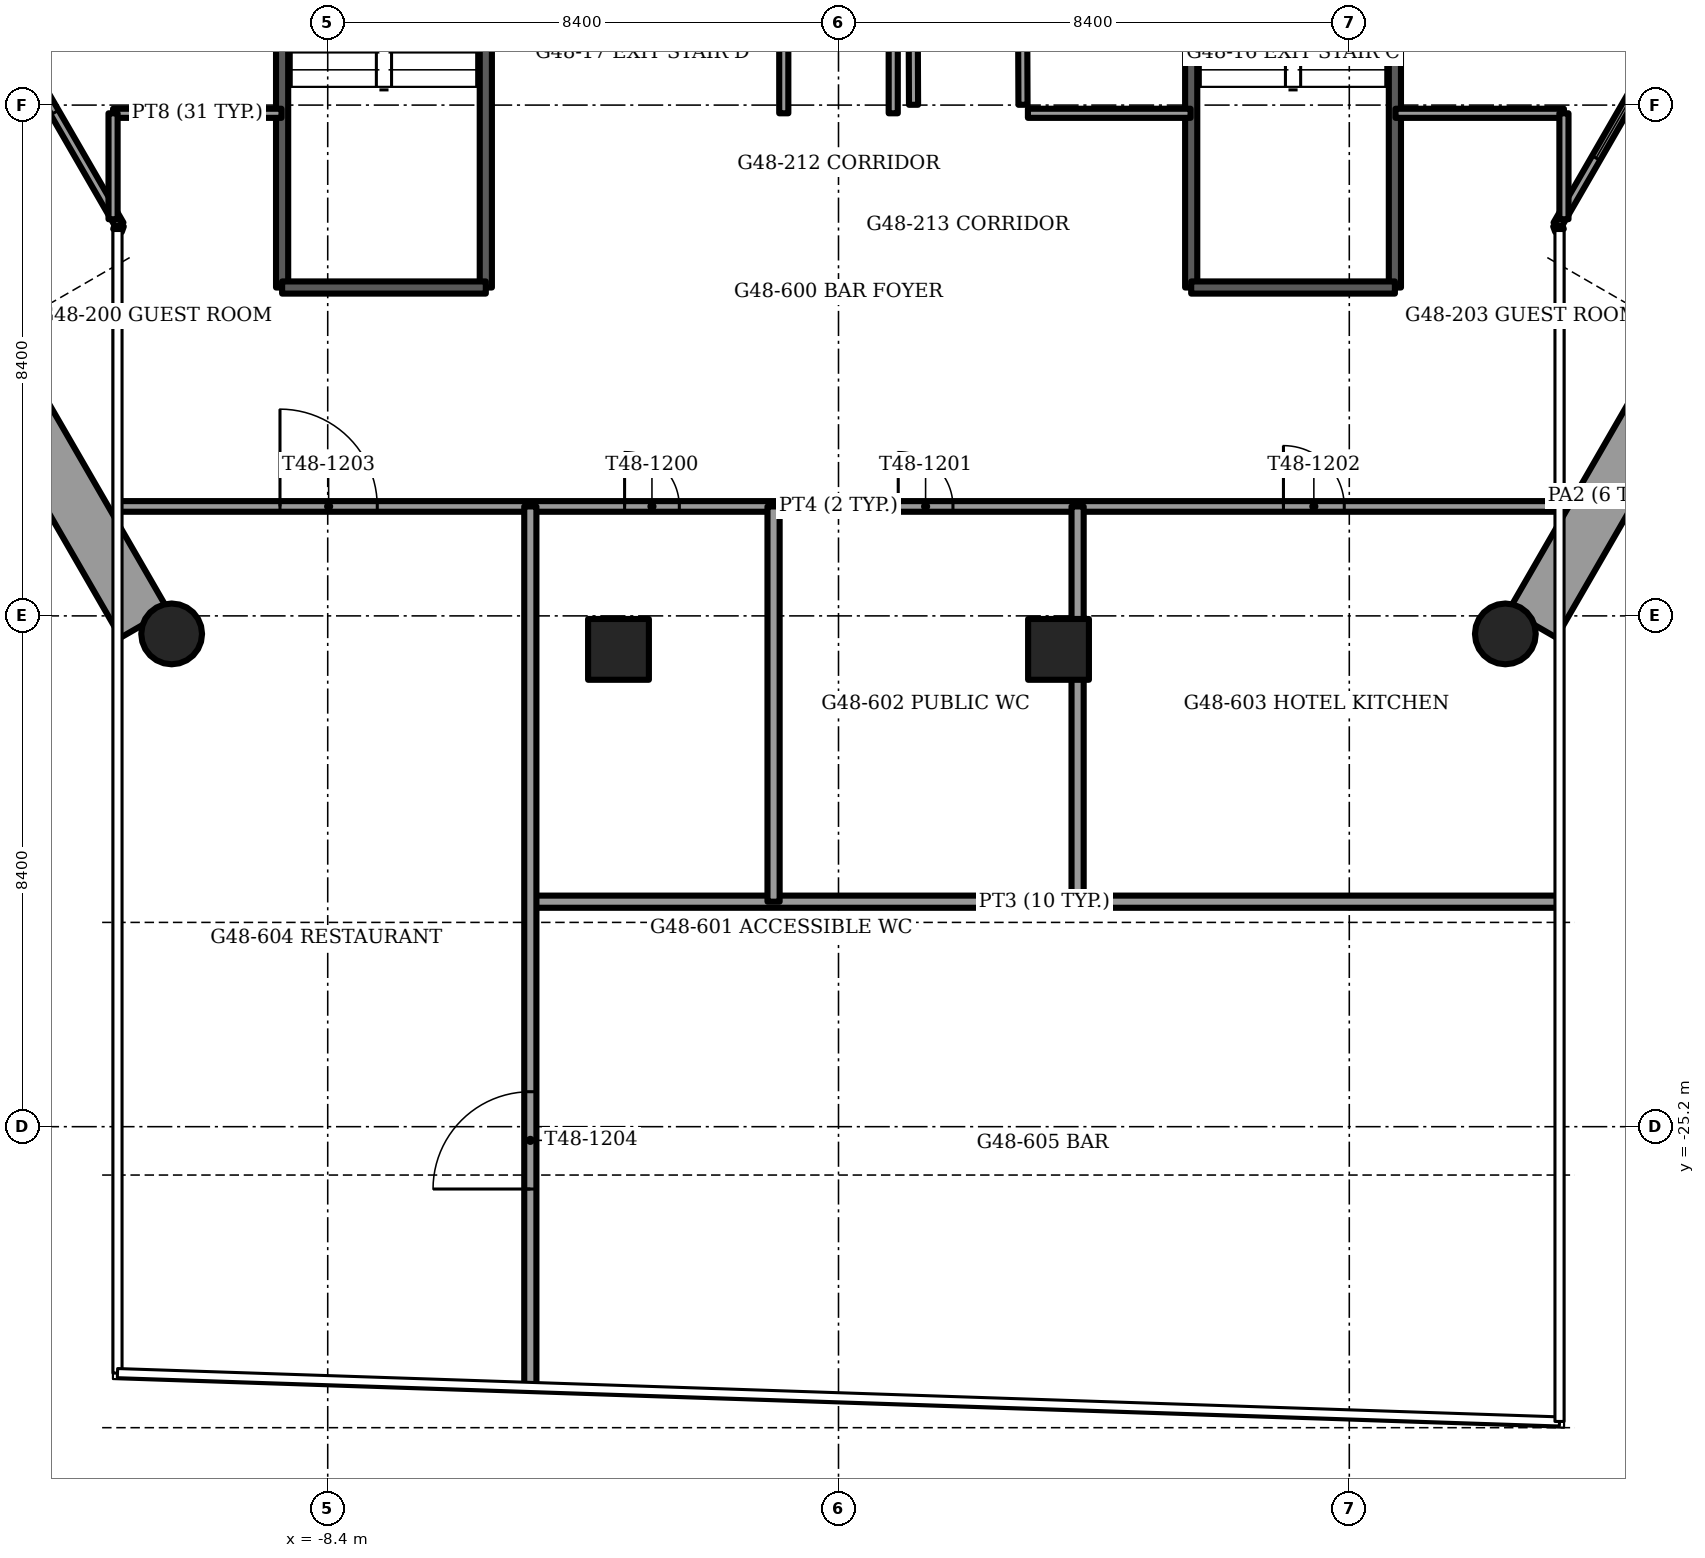
"""IFC4 building model, lengths in metres.
Left out: names, types, materials, properties, quantities, classifications, styles, units other than length and angle.
Written with IfcOpenShell. Run it as: python <this file> out.ifc"""

import sys

from ifc_helpers import new_model, si_unit, direction, frame, frame_2d, origin, origin_2d, place, context, subcontext, project, spatial, rectangle, circle, extrude, element, fill, save


model = new_model("IFC4")
c1 = context("Model", 3, precision=1e-05, world=origin(), true_north=direction((0.0, 1.0)))
c2 = subcontext(c1, "Body", "Model", "MODEL_VIEW")
j1 = project(units=[si_unit("LENGTHUNIT", "METRE"), si_unit("PLANEANGLEUNIT", "RADIAN")], contexts=[c1])
p1 = place(None, origin())
s1 = spatial("IfcSite", under=j1, at=p1, CompositionType="ELEMENT")
p2 = place(p1, origin())
s2 = spatial("IfcBuilding", under=s1, at=p2, CompositionType="ELEMENT")
p3 = place(p2, frame((0.0, 0.0, 194.5)))
s3 = spatial("IfcBuildingStorey", under=s2, at=p3, CompositionType="ELEMENT", Elevation=194.5)
for number, where, z_axis, x_axis in (
    (1, (-10.967, -17.096, -1.2), (0.0, 0.0, 1.0), (1.0, 0.0, 0.0)),
    (2, (10.967, -17.096, -1.2), (0.0, 0.0, 1.0), (1.0, 0.0, 0.0)),
):
    element("IfcColumn", number, at=place(p3, frame(where, z_axis=z_axis, x_axis=x_axis)), inside=s3, PredefinedType="COLUMN", context=c2, shape_type="SweptSolid", body=[
        extrude(circle(Radius=0.5, at=origin_2d()), origin(), (0.0, 0.0, 1.0), 3.75),
    ])
for number, where, z_axis, x_axis in (
    (3, (-3.618, -17.351, -1.2), (0.0, 0.0, 1.0), (-1.0, 0.0, 0.0)),
    (4, (3.618, -17.351, -1.2), (0.0, 0.0, 1.0), (-1.0, 0.0, 0.0)),
):
    element("IfcColumn", number, at=place(p3, frame(where, z_axis=z_axis, x_axis=x_axis)), inside=s3, PredefinedType="COLUMN", context=c2, shape_type="SweptSolid", body=[
        extrude(rectangle(XDim=1.0, YDim=1.0, at=origin_2d()), origin(), (0.0, 0.0, 1.0), 3.75),
    ])
for number, where, z_axis, x_axis in (
    (5, (-13.847, -12.715, 0.0), (0.0, 0.0, 1.0), (0.5, -0.866, 0.0)),
    (6, (11.414, -16.931, 0.0), (0.0, 0.0, 1.0), (0.5, 0.866, 0.0)),
):
    element("IfcWall", number, at=place(p3, frame(where, z_axis=z_axis, x_axis=x_axis)), inside=s3, PredefinedType="PARAPET", context=c2, shape_type="SweptSolid", body=[
        extrude(rectangle(XDim=4.868, YDim=0.9, at=frame_2d((2.434, 0.0))), origin(), (0.0, 0.0, 1.0), 1.1),
    ])
p4 = place(p3, frame((-16.956, -1.482, 0.0), z_axis=(0.0, 0.0, 1.0), x_axis=(0.499996992154, -0.866027140358, 0.0)))
e7 = element("IfcWall", 7, at=p4, inside=s3, PredefinedType="SOLIDWALL", context=c2, shape_type="SweptSolid", body=[
    extrude(rectangle(XDim=10.264, YDim=0.15, at=frame_2d((5.132, 0.0))), origin(), (0.0, 0.0, 1.0), 3.45),
])
p5 = place(p4, frame((2.885, 0.0, 0.15)))
e8 = element("IfcOpeningElement", 8, at=p5, cuts=e7, PredefinedType="OPENING", context=c2, shape_type="SweptSolid", body=[
    extrude(rectangle(XDim=1.6, YDim=2.2, at=frame_2d((0.8, 1.1))), frame((0.0, 0.075, 0.0), z_axis=(0.0, -1.0, 0.0), x_axis=(1.0, 0.0, 0.0)), (0.0, 0.0, 1.0), 0.15),
])
p6 = place(p4, frame((5.395, 0.0, 0.15)))
e9 = element("IfcOpeningElement", 9, at=p6, cuts=e7, PredefinedType="OPENING", context=c2, shape_type="SweptSolid", body=[
    extrude(rectangle(XDim=0.9, YDim=2.2, at=frame_2d((0.45, 1.1))), frame((0.0, 0.075, 0.0), z_axis=(0.0, -1.0, 0.0), x_axis=(1.0, 0.0, 0.0)), (0.0, 0.0, 1.0), 0.15),
])
p7 = place(p4, frame((6.73, 0.0, 0.0)))
e10 = element("IfcOpeningElement", 10, at=p7, cuts=e7, PredefinedType="OPENING", context=c2, shape_type="SweptSolid", body=[
    extrude(rectangle(XDim=1.4, YDim=2.4, at=frame_2d((0.7, 1.2))), frame((0.0, 0.075, 0.0), z_axis=(0.0, -1.0, 0.0), x_axis=(1.0, 0.0, 0.0)), (0.0, 0.0, 1.0), 0.15),
])
p8 = place(p3, frame((11.824, -10.37, 0.0), z_axis=(0.0, 0.0, 1.0), x_axis=(0.499996992154, 0.866027140358, 0.0)))
e11 = element("IfcWall", 11, at=p8, inside=s3, PredefinedType="SOLIDWALL", context=c2, shape_type="SweptSolid", body=[
    extrude(rectangle(XDim=10.264, YDim=0.15, at=frame_2d((5.132, 0.0))), origin(), (0.0, 0.0, 1.0), 3.45),
])
p9 = place(p8, frame((1.269, 0.0, 0.15)))
e12 = element("IfcOpeningElement", 12, at=p9, cuts=e11, PredefinedType="OPENING", context=c2, shape_type="SweptSolid", body=[
    extrude(rectangle(XDim=1.6, YDim=2.2, at=frame_2d((0.8, 1.1))), frame((0.0, 0.075, 0.0), z_axis=(0.0, -1.0, 0.0), x_axis=(1.0, 0.0, 0.0)), (0.0, 0.0, 1.0), 0.15),
])
p10 = place(p8, frame((3.469, 0.0, 0.0)))
e13 = element("IfcOpeningElement", 13, at=p10, cuts=e11, PredefinedType="OPENING", context=c2, shape_type="SweptSolid", body=[
    extrude(rectangle(XDim=1.4, YDim=2.4, at=frame_2d((0.7, 1.2))), frame((0.0, 0.075, 0.0), z_axis=(0.0, -1.0, 0.0), x_axis=(1.0, 0.0, 0.0)), (0.0, 0.0, 1.0), 0.15),
])
p11 = place(p8, frame((5.469, 0.0, 0.15)))
e14 = element("IfcOpeningElement", 14, at=p11, cuts=e11, PredefinedType="OPENING", context=c2, shape_type="SweptSolid", body=[
    extrude(rectangle(XDim=1.6, YDim=2.2, at=frame_2d((0.8, 1.1))), frame((0.0, 0.075, 0.0), z_axis=(0.0, -1.0, 0.0), x_axis=(1.0, 0.0, 0.0)), (0.0, 0.0, 1.0), 0.15),
])
for number, where, z_axis, x_axis in (
    (15, (-11.824, -10.37, 0.0), (0.0, 0.0, 1.0), (-0.339, -0.941, 0.0)),
    (16, (11.824, -10.37, 0.0), (0.0, 0.0, 1.0), (0.339, -0.941, 0.0)),
):
    element("IfcWall", number, at=place(p3, frame(where, z_axis=z_axis, x_axis=x_axis)), inside=s3, PredefinedType="SOLIDWALL", context=c2, shape_type="SweptSolid", body=[
        extrude(rectangle(XDim=0.098, YDim=0.15, at=frame_2d((0.049, 0.0))), origin(), (0.0, 0.0, 1.0), 3.45),
    ])
for number, where, z_axis, x_axis in (
    (17, (5.8, -3.7, -0.3), (0.0, 0.0, 1.0), (0.0, -1.0, 0.0)),
    (18, (9.15, -3.7, -0.3), (0.0, 0.0, 1.0), (0.0, -1.0, 0.0)),
):
    element("IfcWall", number, at=place(p3, frame(where, z_axis=z_axis, x_axis=x_axis)), inside=s3, PredefinedType="SOLIDWALL", context=c2, shape_type="SweptSolid", body=[
        extrude(rectangle(XDim=7.7, YDim=0.2, at=frame_2d((3.85, 0.0))), origin(), (0.0, 0.0, 1.0), 3.75),
    ])
p12 = place(p3, frame((5.8, -11.4, -0.3), z_axis=(0.0, 0.0, 1.0), x_axis=(1.0, 0.0, 0.0)))
e19 = element("IfcWall", 19, at=p12, inside=s3, PredefinedType="SOLIDWALL", context=c2, shape_type="SweptSolid", body=[
    extrude(rectangle(XDim=3.35, YDim=0.2, at=frame_2d((1.675, 0.0))), origin(), (0.0, 0.0, 1.0), 3.75),
])
for number, where, z_axis, x_axis in (
    (20, (-9.15, -3.7, -0.3), (0.0, 0.0, 1.0), (0.0, -1.0, 0.0)),
    (21, (-5.8, -3.7, -0.3), (0.0, 0.0, 1.0), (0.0, -1.0, 0.0)),
):
    element("IfcWall", number, at=place(p3, frame(where, z_axis=z_axis, x_axis=x_axis)), inside=s3, PredefinedType="SOLIDWALL", context=c2, shape_type="SweptSolid", body=[
        extrude(rectangle(XDim=7.7, YDim=0.2, at=frame_2d((3.85, 0.0))), origin(), (0.0, 0.0, 1.0), 3.75),
    ])
p13 = place(p3, frame((-9.15, -11.4, -0.3), z_axis=(0.0, 0.0, 1.0), x_axis=(1.0, 0.0, 0.0)))
e22 = element("IfcWall", 22, at=p13, inside=s3, PredefinedType="SOLIDWALL", context=c2, shape_type="SweptSolid", body=[
    extrude(rectangle(XDim=3.35, YDim=0.2, at=frame_2d((1.675, 0.0))), origin(), (0.0, 0.0, 1.0), 3.75),
])
p14 = place(p3, frame((-11.93, -8.535, 0.0), z_axis=(0.0, 0.0, 1.0), x_axis=(1.0, 0.0, 0.0)))
e23 = element("IfcWall", 23, at=p14, inside=s3, PredefinedType="PARTITIONING", context=c2, shape_type="SweptSolid", body=[
    extrude(rectangle(XDim=2.77, YDim=0.15, at=frame_2d((1.385, 0.0))), origin(), (0.0, 0.0, 1.0), 3.45),
])
p15 = place(p3, frame((3.115, -8.535, 0.0), z_axis=(0.0, 0.0, 1.0), x_axis=(1.0, 0.0, 0.0)))
e24 = element("IfcWall", 24, at=p15, inside=s3, PredefinedType="PARTITIONING", context=c2, shape_type="SweptSolid", body=[
    extrude(rectangle(XDim=2.675, YDim=0.15, at=frame_2d((1.337, 0.0))), origin(), (0.0, 0.0, 1.0), 3.45),
])
p16 = place(p3, frame((9.16, -8.535, 0.0), z_axis=(0.0, 0.0, 1.0), x_axis=(1.0, 0.0, 0.0)))
e25 = element("IfcWall", 25, at=p16, inside=s3, PredefinedType="PARTITIONING", context=c2, shape_type="SweptSolid", body=[
    extrude(rectangle(XDim=2.77, YDim=0.15, at=frame_2d((1.385, 0.0))), origin(), (0.0, 0.0, 1.0), 3.45),
])
p17 = place(p3, frame((11.93, -10.277, 0.0), z_axis=(0.0, 0.0, 1.0), x_axis=(0.0, 1.0, 0.0)))
e26 = element("IfcWall", 26, at=p17, inside=s3, PredefinedType="PARTITIONING", context=c2, shape_type="SweptSolid", body=[
    extrude(rectangle(XDim=1.742, YDim=0.15, at=frame_2d((0.871, 0.0))), origin(), (0.0, 0.0, 1.0), 3.45),
])
for number, where, z_axis, x_axis in (
    (27, (0.9, -8.535, 0.0), (0.0, 0.0, 1.0), (0.0, 1.0, 0.0)),
    (28, (-0.9, -8.535, 0.0), (0.0, 0.0, 1.0), (0.0, 1.0, 0.0)),
):
    element("IfcWall", number, at=place(p3, frame(where, z_axis=z_axis, x_axis=x_axis)), inside=s3, PredefinedType="PARTITIONING", context=c2, shape_type="SweptSolid", body=[
        extrude(rectangle(XDim=4.835, YDim=0.15, at=frame_2d((2.417, 0.0))), origin(), (0.0, 0.0, 1.0), 3.45),
    ])
p18 = place(p3, frame((-11.93, -10.277, 0.0), z_axis=(0.0, 0.0, 1.0), x_axis=(0.0, 1.0, 0.0)))
e29 = element("IfcWall", 29, at=p18, inside=s3, PredefinedType="PARTITIONING", context=c2, shape_type="SweptSolid", body=[
    extrude(rectangle(XDim=1.742, YDim=0.15, at=frame_2d((0.871, 0.0))), origin(), (0.0, 0.0, 1.0), 3.45),
])
p19 = place(p3, frame((3.034, -8.395, 0.0), z_axis=(0.0, 0.0, 1.0), x_axis=(-0.004055917967, 0.999991774731, 0.0)))
e30 = element("IfcWall", 30, at=p19, inside=s3, PredefinedType="PARTITIONING", context=c2, shape_type="SweptSolid", body=[
    extrude(rectangle(XDim=4.695, YDim=0.15, at=frame_2d((2.348, 0.0))), origin(), (0.0, 0.0, 1.0), 3.45),
])
p20 = place(p19, frame((1.778, 0.0, 0.0)))
e31 = element("IfcOpeningElement", 31, at=p20, cuts=e30, PredefinedType="OPENING", context=c2, shape_type="SweptSolid", body=[
    extrude(rectangle(XDim=1.0, YDim=2.1, at=frame_2d((0.5, 1.05))), frame((0.0, 0.075, 0.0), z_axis=(0.0, -1.0, 0.0), x_axis=(1.0, 0.0, 0.0)), (0.0, 0.0, 1.0), 0.15),
])
p21 = place(p3, frame((1.234, -8.395, 0.0), z_axis=(0.0, 0.0, 1.0), x_axis=(-0.004008296795, 0.999991966746, 0.0)))
e32 = element("IfcWall", 32, at=p21, inside=s3, PredefinedType="PARTITIONING", context=c2, shape_type="SweptSolid", body=[
    extrude(rectangle(XDim=4.69, YDim=0.15, at=frame_2d((2.345, 0.0))), origin(), (0.0, 0.0, 1.0), 3.45),
])
p22 = place(p3, frame((-11.838, -15.0, 0.0), z_axis=(0.0, 0.0, 1.0), x_axis=(1.0, 0.0, 0.0)))
e33 = element("IfcWall", 33, at=p22, inside=s3, PredefinedType="PARTITIONING", context=c2, shape_type="SweptSolid", body=[
    extrude(rectangle(XDim=23.676, YDim=0.175, at=frame_2d((11.838, 0.0))), origin(), (0.0, 0.0, 1.0), 3.45),
])
p23 = place(p22, frame((8.32, 0.0, 0.0)))
e34 = element("IfcOpeningElement", 34, at=p23, cuts=e33, PredefinedType="OPENING", context=c2, shape_type="SweptSolid", body=[
    extrude(rectangle(XDim=0.9, YDim=2.1, at=frame_2d((0.45, 1.05))), frame((0.0, 0.087, 0.0), z_axis=(0.0, -1.0, 0.0), x_axis=(1.0, 0.0, 0.0)), (0.0, 0.0, 1.0), 0.175),
])
p24 = place(p22, frame((12.82, 0.0, 0.0)))
e35 = element("IfcOpeningElement", 35, at=p24, cuts=e33, PredefinedType="OPENING", context=c2, shape_type="SweptSolid", body=[
    extrude(rectangle(XDim=0.9, YDim=2.1, at=frame_2d((0.45, 1.05))), frame((0.0, 0.087, 0.0), z_axis=(0.0, -1.0, 0.0), x_axis=(1.0, 0.0, 0.0)), (0.0, 0.0, 1.0), 0.175),
])
p25 = place(p22, frame((19.156, 0.0, 0.0)))
e36 = element("IfcOpeningElement", 36, at=p25, cuts=e33, PredefinedType="OPENING", context=c2, shape_type="SweptSolid", body=[
    extrude(rectangle(XDim=1.0, YDim=2.1, at=frame_2d((0.5, 1.05))), frame((0.0, 0.087, 0.0), z_axis=(0.0, -1.0, 0.0), x_axis=(1.0, 0.0, 0.0)), (0.0, 0.0, 1.0), 0.175),
])
p26 = place(p22, frame((2.653, 0.0, 0.0)))
e37 = element("IfcOpeningElement", 37, at=p26, cuts=e33, PredefinedType="OPENING", context=c2, shape_type="SweptSolid", body=[
    extrude(rectangle(XDim=1.6, YDim=2.1, at=frame_2d((0.8, 1.05))), frame((0.0, 0.087, 0.0), z_axis=(0.0, -1.0, 0.0), x_axis=(1.0, 0.0, 0.0)), (0.0, 0.0, 1.0), 0.175),
])
p27 = place(p3, frame((-5.068, -21.5, 0.0), z_axis=(0.0, 0.0, 1.0), x_axis=(1.0, 0.0, 0.0)))
e38 = element("IfcWall", 38, at=p27, inside=s3, PredefinedType="PARTITIONING", context=c2, shape_type="SweptSolid", body=[
    extrude(rectangle(XDim=16.906, YDim=0.2, at=frame_2d((8.453, 0.0))), origin(), (0.0, 0.0, 1.0), 3.45),
])
p28 = place(p3, frame((-5.068, -29.461, 0.0), z_axis=(0.0, 0.0, 1.0), x_axis=(0.0, 1.0, 0.0)))
e39 = element("IfcWall", 39, at=p28, inside=s3, PredefinedType="PARTITIONING", context=c2, shape_type="SweptSolid", body=[
    extrude(rectangle(XDim=14.461, YDim=0.2, at=frame_2d((7.23, 0.0))), origin(), (0.0, 0.0, 1.0), 2.839),
])
p29 = place(p28, frame((3.236, 0.0, 0.0)))
e40 = element("IfcOpeningElement", 40, at=p29, cuts=e39, PredefinedType="OPENING", context=c2, shape_type="SweptSolid", body=[
    extrude(rectangle(XDim=1.6, YDim=2.1, at=frame_2d((0.8, 1.05))), frame((0.0, 0.1, 0.0), z_axis=(0.0, -1.0, 0.0), x_axis=(1.0, 0.0, 0.0)), (0.0, 0.0, 1.0), 0.2),
])
for number, where, z_axis, x_axis in (
    (41, (-1.068, -21.5, 0.0), (0.0, 0.0, 1.0), (0.0, 1.0, 0.0)),
    (42, (3.932, -21.5, 0.0), (0.0, 0.0, 1.0), (0.0, 1.0, 0.0)),
):
    element("IfcWall", number, at=place(p3, frame(where, z_axis=z_axis, x_axis=x_axis)), inside=s3, PredefinedType="PARTITIONING", context=c2, shape_type="SweptSolid", body=[
        extrude(rectangle(XDim=6.5, YDim=0.2, at=frame_2d((3.25, 0.0))), origin(), (0.0, 0.0, 1.0), 3.45),
    ])
p30 = place(p7, origin())
e43 = element("IfcDoor", 43, at=p30, inside=s3, OperationType="SLIDING_TO_RIGHT", PredefinedType="DOOR", context=c2, shape_type="SweptSolid", body=[
    extrude(rectangle(XDim=1.4, YDim=2.4, at=frame_2d((0.7, 1.2))), frame((0.0, 0.025, 0.0), z_axis=(0.0, -1.0, 0.0), x_axis=(1.0, 0.0, 0.0)), (0.0, 0.0, 1.0), 0.05),
])
fill(e10, e43)
p31 = place(p9, origin())
e44 = element("IfcWindow", 44, at=p31, inside=s3, PartitioningType="SINGLE_PANEL", PredefinedType="WINDOW", context=c2, shape_type="SweptSolid", body=[
    extrude(rectangle(XDim=1.6, YDim=2.2, at=frame_2d((0.8, 1.1))), frame((0.0, 0.03, 0.0), z_axis=(0.0, -1.0, 0.0), x_axis=(1.0, 0.0, 0.0)), (0.0, 0.0, 1.0), 0.06),
])
fill(e12, e44)
p32 = place(p23, origin())
e45 = element("IfcDoor", 45, at=p32, inside=s3, OperationType="SINGLE_SWING_RIGHT", PredefinedType="DOOR", context=c2, shape_type="SweptSolid", body=[
    extrude(rectangle(XDim=0.9, YDim=2.1, at=frame_2d((0.45, 1.05))), frame((0.0, 0.025, 0.0), z_axis=(0.0, -1.0, 0.0), x_axis=(1.0, 0.0, 0.0)), (0.0, 0.0, 1.0), 0.05),
])
fill(e34, e45)
p33 = place(p24, origin())
e46 = element("IfcDoor", 46, at=p33, inside=s3, OperationType="SINGLE_SWING_LEFT", PredefinedType="DOOR", context=c2, shape_type="SweptSolid", body=[
    extrude(rectangle(XDim=0.9, YDim=2.1, at=frame_2d((0.45, 1.05))), frame((0.0, 0.025, 0.0), z_axis=(0.0, -1.0, 0.0), x_axis=(1.0, 0.0, 0.0)), (0.0, 0.0, 1.0), 0.05),
])
fill(e35, e46)
p34 = place(p25, origin())
e47 = element("IfcDoor", 47, at=p34, inside=s3, OperationType="SINGLE_SWING_RIGHT", PredefinedType="DOOR", context=c2, shape_type="SweptSolid", body=[
    extrude(rectangle(XDim=1.0, YDim=2.1, at=frame_2d((0.5, 1.05))), frame((0.0, 0.025, 0.0), z_axis=(0.0, -1.0, 0.0), x_axis=(1.0, 0.0, 0.0)), (0.0, 0.0, 1.0), 0.05),
])
fill(e36, e47)
p35 = place(p26, origin())
e48 = element("IfcDoor", 48, at=p35, inside=s3, OperationType="DOUBLE_DOOR_SINGLE_SWING", PredefinedType="DOOR", context=c2, shape_type="SweptSolid", body=[
    extrude(rectangle(XDim=1.6, YDim=2.1, at=frame_2d((0.8, 1.05))), frame((0.0, 0.025, 0.0), z_axis=(0.0, -1.0, 0.0), x_axis=(1.0, 0.0, 0.0)), (0.0, 0.0, 1.0), 0.05),
])
fill(e37, e48)
p36 = place(p29, origin())
e49 = element("IfcDoor", 49, at=p36, inside=s3, OperationType="DOUBLE_DOOR_SINGLE_SWING", PredefinedType="DOOR", context=c2, shape_type="SweptSolid", body=[
    extrude(rectangle(XDim=1.6, YDim=2.1, at=frame_2d((0.8, 1.05))), frame((0.0, 0.025, 0.0), z_axis=(0.0, -1.0, 0.0), x_axis=(1.0, 0.0, 0.0)), (0.0, 0.0, 1.0), 0.05),
])
fill(e40, e49)
save(model, sys.argv[1])
